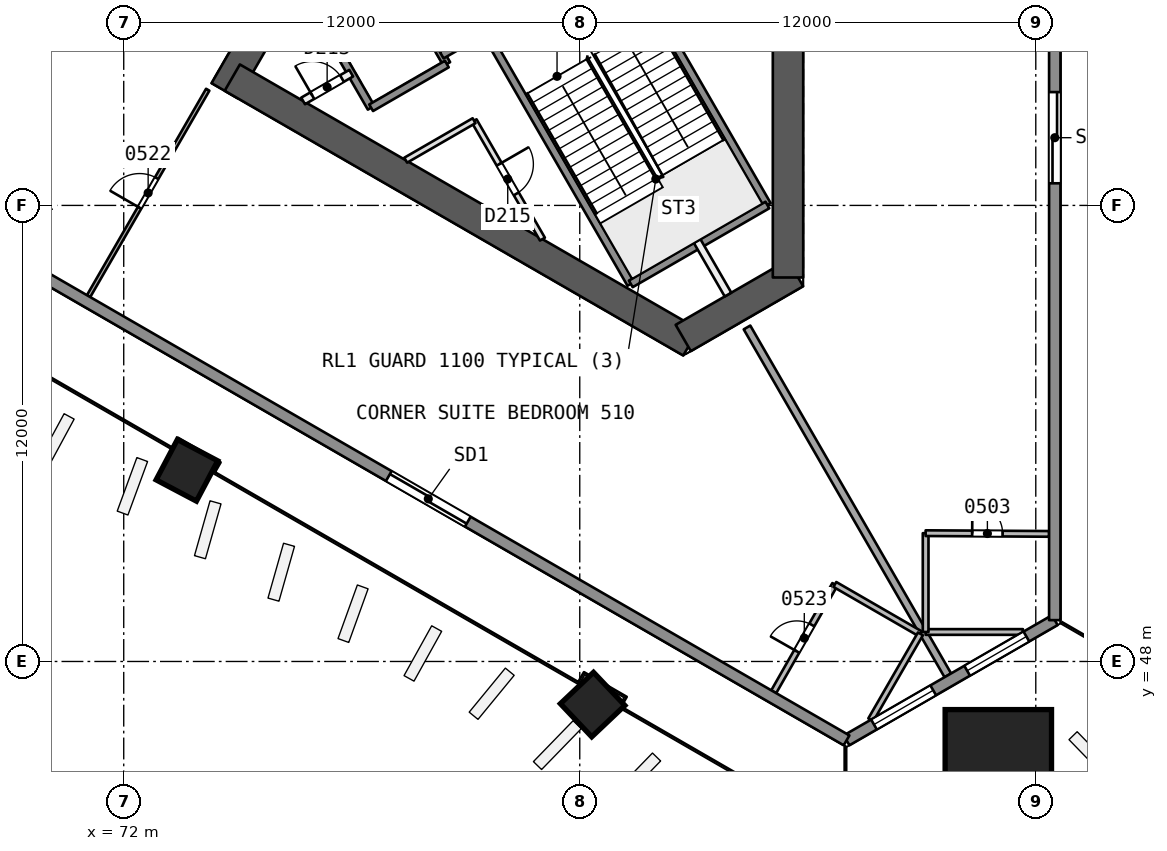
"""IFC4 building model, lengths in metres.
Left out: names, types, materials, properties, quantities, classifications, styles, units other than length and angle.
Written with IfcOpenShell. Run it as: python <this file> out.ifc"""

import sys

from ifc_helpers import new_model, si_unit, direction, frame, frame_2d, origin, origin_2d, place, context, subcontext, project, spatial, rectangle, extrude, element, fill, save


model = new_model("IFC4")
c1 = context("Model", 3, precision=1e-05, world=origin(), true_north=direction((0.0, 1.0)))
c2 = subcontext(c1, "Body", "Model", "MODEL_VIEW")
j1 = project(units=[si_unit("LENGTHUNIT", "METRE"), si_unit("PLANEANGLEUNIT", "RADIAN")], contexts=[c1])
p1 = place(None, origin())
s1 = spatial("IfcSite", under=j1, at=p1, CompositionType="ELEMENT")
p2 = place(p1, origin())
s2 = spatial("IfcBuilding", under=s1, at=p2, CompositionType="ELEMENT")
p3 = place(p2, frame((0.0, 0.0, 30.0)))
s3 = spatial("IfcBuildingStorey", under=s2, at=p3, CompositionType="ELEMENT", Elevation=30.0)
p4 = place(p3, frame((79.731, 71.806, 0.0), z_axis=(0.0, 0.0, 1.0), x_axis=(-0.49999662545, -0.866027352073, 0.0)))
e1 = element("IfcWall", 1, at=p4, inside=s3, PredefinedType="SHEAR", context=c2, shape_type="SweptSolid", body=[
    extrude(rectangle(XDim=10.149, YDim=0.8, at=frame_2d((5.074, 0.0))), origin(), (0.0, 0.0, 1.0), 3.7),
])
p5 = place(p4, frame((0.719, 0.0, 0.0)))
e2 = element("IfcOpeningElement", 2, at=p5, cuts=e1, PredefinedType="OPENING", context=c2, shape_type="SweptSolid", body=[
    extrude(rectangle(XDim=1.2, YDim=2.1, at=frame_2d((0.6, 1.05))), frame((0.0, 0.411, 0.0), z_axis=(0.0, -1.0, 0.0), x_axis=(1.0, 0.0, 0.0)), (0.0, 0.0, 1.0), 0.821),
])
p6 = place(p3, frame((74.856, 63.363, 0.0), z_axis=(0.0, 0.0, 1.0), x_axis=(0.866029478545, -0.499992942241, 0.0)))
e3 = element("IfcWall", 3, at=p6, inside=s3, PredefinedType="SHEAR", context=c2, shape_type="SweptSolid", body=[
    extrude(rectangle(XDim=13.933, YDim=0.8, at=frame_2d((6.967, 0.0))), origin(), (0.0, 0.0, 1.0), 3.7),
])
p7 = place(p3, frame((86.723, 56.512, 0.0), z_axis=(0.0, 0.0, 1.0), x_axis=(0.866034355626, 0.499984494636, 0.0)))
e4 = element("IfcWall", 4, at=p7, inside=s3, PredefinedType="SHEAR", context=c2, shape_type="SweptSolid", body=[
    extrude(rectangle(XDim=3.414, YDim=0.8, at=frame_2d((1.707, 0.0))), origin(), (0.0, 0.0, 1.0), 3.7),
])
p8 = place(p3, frame((89.48, 58.103, 0.0), z_axis=(0.0, 0.0, 1.0), x_axis=(0.0, 1.0, 0.0)))
e5 = element("IfcWall", 5, at=p8, inside=s3, PredefinedType="SHEAR", context=c2, shape_type="SweptSolid", body=[
    extrude(rectangle(XDim=14.103, YDim=0.8, at=frame_2d((7.051, 0.0))), origin(), (0.0, 0.0, 1.0), 3.7),
])
p9 = place(p3, frame((73.662, 53.002, 0.0), z_axis=(0.000857578916, 0.022824792675, 0.999739112668), x_axis=(-0.499938956565, -0.865825126557, 0.020196285069)))
e6 = element("IfcColumn", 6, at=p9, inside=s3, PredefinedType="COLUMN", context=c2, shape_type="SweptSolid", body=[
    extrude(rectangle(XDim=1.2, YDim=1.2, at=origin_2d()), origin(), (0.0, 0.0, 1.0), 3.701),
])
p10 = place(p3, frame((84.349, 46.832, 0.0), z_axis=(-0.008376454378, 0.028163354484, 0.999568237028), x_axis=(-0.500232049542, -0.86565577712, 0.020198320458)))
e7 = element("IfcColumn", 7, at=p10, inside=s3, PredefinedType="COLUMN", context=c2, shape_type="SweptSolid", body=[
    extrude(rectangle(XDim=1.2, YDim=1.2, at=origin_2d()), origin(), (0.0, 0.0, 1.0), 3.702),
])
p11 = place(p3, frame((95.035, 45.298, 0.0), z_axis=(-0.017607037296, 0.030466109479, 0.999380712447), x_axis=(-0.865809063816, -0.500374524745, 1.32655e-07)))
e8 = element("IfcColumn", 8, at=p11, inside=s3, PredefinedType="COLUMN", context=c2, shape_type="SweptSolid", body=[
    extrude(rectangle(XDim=2.8, YDim=2.8, at=origin_2d()), origin(), (0.0, 0.0, 1.0), 3.702),
])
p12 = place(p3, frame((95.662, 48.776, 0.0), z_axis=(0.0, 0.0, 1.0), x_axis=(-1.0, 0.0, 0.0)))
e9 = element("IfcWall", 9, at=p12, inside=s3, PredefinedType="PARTITIONING", context=c2, shape_type="SweptSolid", body=[
    extrude(rectangle(XDim=2.561, YDim=0.15, at=frame_2d((1.28, 0.0))), origin(), (0.0, 0.0, 1.0), 3.2),
])
p13 = place(p3, frame((93.102, 48.776, 0.0), z_axis=(0.0, 0.0, 1.0), x_axis=(0.0, 1.0, 0.0)))
e10 = element("IfcWall", 10, at=p13, inside=s3, PredefinedType="PARTITIONING", context=c2, shape_type="SweptSolid", body=[
    extrude(rectangle(XDim=2.6, YDim=0.15, at=frame_2d((1.3, 0.0))), origin(), (0.0, 0.0, 1.0), 3.2),
])
p14 = place(p3, frame((93.102, 51.376, 0.0), z_axis=(0.0, 0.0, 1.0), x_axis=(0.999982829145, -0.005860154821, 0.0)))
e11 = element("IfcWall", 11, at=p14, inside=s3, PredefinedType="PARTITIONING", context=c2, shape_type="SweptSolid", body=[
    extrude(rectangle(XDim=3.25, YDim=0.15, at=frame_2d((1.625, 0.0))), origin(), (0.0, 0.0, 1.0), 3.2),
])
p15 = place(p14, frame((1.225, 0.0, 0.0)))
e12 = element("IfcOpeningElement", 12, at=p15, cuts=e11, PredefinedType="OPENING", context=c2, shape_type="SweptSolid", body=[
    extrude(rectangle(XDim=0.8, YDim=2.1, at=frame_2d((0.4, 1.05))), frame((0.0, 0.085, 0.0), z_axis=(0.0, -1.0, 0.0), x_axis=(1.0, 0.0, 0.0)), (0.0, 0.0, 1.0), 0.171),
])
p16 = place(p3, frame((88.401, 56.789, 0.0), z_axis=(0.0, 0.0, 1.0), x_axis=(0.499997037832, -0.866027113986, 0.0)))
e13 = element("IfcWall", 13, at=p16, inside=s3, PredefinedType="PARTITIONING", context=c2, shape_type="SweptSolid", body=[
    extrude(rectangle(XDim=10.57, YDim=0.2, at=frame_2d((5.285, 0.0))), origin(), (0.0, 0.0, 1.0), 3.2),
])
p17 = place(p3, frame((63.919, 61.743, 0.0), z_axis=(0.0, 0.0, 1.0), x_axis=(0.500004709601, 0.866022684678, 0.0)))
e14 = element("IfcWall", 14, at=p17, inside=s3, PredefinedType="PARTITIONING", context=c2, shape_type="SweptSolid", body=[
    extrude(rectangle(XDim=14.251, YDim=0.2, at=frame_2d((7.125, 0.0))), origin(), (0.0, 0.0, 1.0), 3.2),
])
p18 = place(p3, frame((66.215, 60.418, 0.0), z_axis=(0.0, 0.0, 1.0), x_axis=(0.499997291418, 0.866026967579, 0.0)))
e15 = element("IfcWall", 15, at=p18, inside=s3, PredefinedType="PARTITIONING", context=c2, shape_type="SweptSolid", body=[
    extrude(rectangle(XDim=14.251, YDim=0.2, at=frame_2d((7.125, 0.0))), origin(), (0.0, 0.0, 1.0), 3.2),
])
p19 = place(p3, frame((71.074, 57.612, 0.0), z_axis=(0.0, 0.0, 1.0), x_axis=(0.499986391729, 0.866033260381, 0.0)))
e16 = element("IfcWall", 16, at=p19, inside=s3, PredefinedType="PARTITIONING", context=c2, shape_type="SweptSolid", body=[
    extrude(rectangle(XDim=6.272, YDim=0.1, at=frame_2d((3.136, 0.0))), origin(), (0.0, 0.0, 1.0), 3.2),
])
p20 = place(p19, frame((2.686, 0.0, 0.0)))
e17 = element("IfcOpeningElement", 17, at=p20, cuts=e16, PredefinedType="OPENING", context=c2, shape_type="SweptSolid", body=[
    extrude(rectangle(XDim=0.9, YDim=2.1, at=frame_2d((0.45, 1.05))), frame((0.0, 0.061, 0.0), z_axis=(0.0, -1.0, 0.0), x_axis=(1.0, 0.0, 0.0)), (0.0, 0.0, 1.0), 0.121),
])
p21 = place(p3, frame((89.104, 47.203, 0.0), z_axis=(0.0, 0.0, 1.0), x_axis=(0.494941047154, 0.868926556069, 0.0)))
e18 = element("IfcWall", 18, at=p21, inside=s3, PredefinedType="PARTITIONING", context=c2, shape_type="SweptSolid", body=[
    extrude(rectangle(XDim=3.25, YDim=0.15, at=frame_2d((1.625, 0.0))), origin(), (0.0, 0.0, 1.0), 3.2),
])
p22 = place(p21, frame((1.225, 0.0, 0.0)))
e19 = element("IfcOpeningElement", 19, at=p22, cuts=e18, PredefinedType="OPENING", context=c2, shape_type="SweptSolid", body=[
    extrude(rectangle(XDim=0.8, YDim=2.1, at=frame_2d((0.4, 1.05))), frame((0.0, 0.085, 0.0), z_axis=(0.0, -1.0, 0.0), x_axis=(1.0, 0.0, 0.0)), (0.0, 0.0, 1.0), 0.171),
])
p23 = place(p3, frame((90.713, 50.027, 0.0), z_axis=(0.0, 0.0, 1.0), x_axis=(0.865997922154, -0.500047596559, 0.0)))
e20 = element("IfcWall", 20, at=p23, inside=s3, PredefinedType="PARTITIONING", context=c2, shape_type="SweptSolid", body=[
    extrude(rectangle(XDim=2.6, YDim=0.15, at=frame_2d((1.3, 0.0))), origin(), (0.0, 0.0, 1.0), 3.2),
])
p24 = place(p3, frame((92.964, 48.727, 0.0), z_axis=(0.0, 0.0, 1.0), x_axis=(-0.499948995201, -0.866054849417, 0.0)))
e21 = element("IfcWall", 21, at=p24, inside=s3, PredefinedType="PARTITIONING", context=c2, shape_type="SweptSolid", body=[
    extrude(rectangle(XDim=2.612, YDim=0.15, at=frame_2d((1.306, 0.0))), origin(), (0.0, 0.0, 1.0), 3.2),
])
p25 = place(p3, frame((96.5, 49.088, 0.0), z_axis=(0.0, 0.0, 1.0), x_axis=(-0.866033291922, -0.499986337096, 0.0)))
e22 = element("IfcWall", 22, at=p25, inside=s3, PredefinedType="SOLIDWALL", context=c2, shape_type="SweptSolid", body=[
    extrude(rectangle(XDim=6.327, YDim=0.3, at=frame_2d((3.164, 0.0))), origin(), (0.0, 0.0, 1.0), 3.2),
])
p26 = place(p25, frame((0.863, 0.0, 0.9)))
e23 = element("IfcOpeningElement", 23, at=p26, cuts=e22, PredefinedType="OPENING", context=c2, shape_type="SweptSolid", body=[
    extrude(rectangle(XDim=1.8, YDim=1.5, at=frame_2d((0.9, 0.75))), frame((0.0, 0.161, 0.0), z_axis=(0.0, -1.0, 0.0), x_axis=(1.0, 0.0, 0.0)), (0.0, 0.0, 1.0), 0.321),
])
p27 = place(p25, frame((3.694, 0.0, 0.9)))
e24 = element("IfcOpeningElement", 24, at=p27, cuts=e22, PredefinedType="OPENING", context=c2, shape_type="SweptSolid", body=[
    extrude(rectangle(XDim=1.8, YDim=1.5, at=frame_2d((0.9, 0.75))), frame((0.0, 0.161, 0.0), z_axis=(0.0, -1.0, 0.0), x_axis=(1.0, 0.0, 0.0)), (0.0, 0.0, 1.0), 0.321),
])
p28 = place(p3, frame((96.5, 110.912, 0.0), z_axis=(0.0, 0.0, 1.0), x_axis=(0.0, -1.0, 0.0)))
e25 = element("IfcWall", 25, at=p28, inside=s3, PredefinedType="SOLIDWALL", context=c2, shape_type="SweptSolid", body=[
    extrude(rectangle(XDim=61.825, YDim=0.3, at=frame_2d((30.912, 0.0))), origin(), (0.0, 0.0, 1.0), 3.2),
])
p29 = place(p28, frame((29.089, 0.0, 0.0)))
e26 = element("IfcOpeningElement", 26, at=p29, cuts=e25, PredefinedType="OPENING", context=c2, shape_type="SweptSolid", body=[
    extrude(rectangle(XDim=2.4, YDim=2.4, at=frame_2d((1.2, 1.2))), frame((0.0, 0.161, 0.0), z_axis=(0.0, -1.0, 0.0), x_axis=(1.0, 0.0, 0.0)), (0.0, 0.0, 1.0), 0.321),
])
p30 = place(p28, frame((34.389, 0.0, 0.0)))
e27 = element("IfcOpeningElement", 27, at=p30, cuts=e25, PredefinedType="OPENING", context=c2, shape_type="SweptSolid", body=[
    extrude(rectangle(XDim=2.4, YDim=2.4, at=frame_2d((1.2, 1.2))), frame((0.0, 0.161, 0.0), z_axis=(0.0, -1.0, 0.0), x_axis=(1.0, 0.0, 0.0)), (0.0, 0.0, 1.0), 0.321),
])
p31 = place(p28, frame((47.93, 0.0, 0.0)))
e28 = element("IfcOpeningElement", 28, at=p31, cuts=e25, PredefinedType="OPENING", context=c2, shape_type="SweptSolid", body=[
    extrude(rectangle(XDim=2.4, YDim=2.4, at=frame_2d((1.2, 1.2))), frame((0.0, 0.161, 0.0), z_axis=(0.0, -1.0, 0.0), x_axis=(1.0, 0.0, 0.0)), (0.0, 0.0, 1.0), 0.321),
])
p32 = place(p28, frame((12.81, 0.0, 0.0)))
e29 = element("IfcOpeningElement", 29, at=p32, cuts=e25, PredefinedType="OPENING", context=c2, shape_type="SweptSolid", body=[
    extrude(rectangle(XDim=2.4, YDim=2.4, at=frame_2d((1.2, 1.2))), frame((0.0, 0.161, 0.0), z_axis=(0.0, -1.0, 0.0), x_axis=(1.0, 0.0, 0.0)), (0.0, 0.0, 1.0), 0.321),
])
p33 = place(p3, frame((91.021, 45.924, 0.0), z_axis=(0.0, 0.0, 1.0), x_axis=(-0.866024340432, 0.500001841776, 0.0)))
e30 = element("IfcWall", 30, at=p33, inside=s3, PredefinedType="SOLIDWALL", context=c2, shape_type="SweptSolid", body=[
    extrude(rectangle(XDim=61.824, YDim=0.3, at=frame_2d((30.912, 0.0))), origin(), (0.0, 0.0, 1.0), 3.2),
])
p34 = place(p33, frame((35.168, 0.0, 0.0)))
e31 = element("IfcOpeningElement", 31, at=p34, cuts=e30, PredefinedType="OPENING", context=c2, shape_type="SweptSolid", body=[
    extrude(rectangle(XDim=2.4, YDim=2.4, at=frame_2d((1.2, 1.2))), frame((0.0, 0.161, 0.0), z_axis=(0.0, -1.0, 0.0), x_axis=(1.0, 0.0, 0.0)), (0.0, 0.0, 1.0), 0.321),
])
p35 = place(p33, frame((47.93, 0.0, 0.0)))
e32 = element("IfcOpeningElement", 32, at=p35, cuts=e30, PredefinedType="OPENING", context=c2, shape_type="SweptSolid", body=[
    extrude(rectangle(XDim=2.4, YDim=2.4, at=frame_2d((1.2, 1.2))), frame((0.0, 0.161, 0.0), z_axis=(0.0, -1.0, 0.0), x_axis=(1.0, 0.0, 0.0)), (0.0, 0.0, 1.0), 0.321),
])
p36 = place(p33, frame((24.724, 0.0, 0.0)))
e33 = element("IfcOpeningElement", 33, at=p36, cuts=e30, PredefinedType="OPENING", context=c2, shape_type="SweptSolid", body=[
    extrude(rectangle(XDim=2.4, YDim=2.4, at=frame_2d((1.2, 1.2))), frame((0.0, 0.161, 0.0), z_axis=(0.0, -1.0, 0.0), x_axis=(1.0, 0.0, 0.0)), (0.0, 0.0, 1.0), 0.321),
])
p37 = place(p33, frame((11.509, 0.0, 0.0)))
e34 = element("IfcOpeningElement", 34, at=p37, cuts=e30, PredefinedType="OPENING", context=c2, shape_type="SweptSolid", body=[
    extrude(rectangle(XDim=2.4, YDim=2.4, at=frame_2d((1.2, 1.2))), frame((0.0, 0.161, 0.0), z_axis=(0.0, -1.0, 0.0), x_axis=(1.0, 0.0, 0.0)), (0.0, 0.0, 1.0), 0.321),
])
p38 = place(p33, frame((31.805, 0.0, 0.9)))
e35 = element("IfcOpeningElement", 35, at=p38, cuts=e30, PredefinedType="OPENING", context=c2, shape_type="SweptSolid", body=[
    extrude(rectangle(XDim=1.8, YDim=1.5, at=frame_2d((0.9, 0.75))), frame((0.0, 0.161, 0.0), z_axis=(0.0, -1.0, 0.0), x_axis=(1.0, 0.0, 0.0)), (0.0, 0.0, 1.0), 0.321),
])
p39 = place(p33, frame((29.155, 0.0, 0.9)))
e36 = element("IfcOpeningElement", 36, at=p39, cuts=e30, PredefinedType="OPENING", context=c2, shape_type="SweptSolid", body=[
    extrude(rectangle(XDim=1.8, YDim=1.5, at=frame_2d((0.9, 0.75))), frame((0.0, 0.161, 0.0), z_axis=(0.0, -1.0, 0.0), x_axis=(1.0, 0.0, 0.0)), (0.0, 0.0, 1.0), 0.321),
])
p40 = place(p3, frame((77.135, 64.952, 0.0), z_axis=(0.0, 0.0, 1.0), x_axis=(0.499996545922, -0.866027397988, 0.0)))
e37 = element("IfcWall", 37, at=p40, inside=s3, PredefinedType="SOLIDWALL", context=c2, shape_type="SweptSolid", body=[
    extrude(rectangle(XDim=2.75, YDim=0.2, at=frame_2d((1.375, 0.0))), origin(), (0.0, 0.0, 1.0), 3.2),
])
p41 = place(p3, frame((81.219, 62.229, 0.0), z_axis=(0.0, 0.0, 1.0), x_axis=(0.499992664208, -0.866029639064, 0.0)))
e38 = element("IfcWall", 38, at=p41, inside=s3, PredefinedType="PARTITIONING", context=c2, shape_type="SweptSolid", body=[
    extrude(rectangle(XDim=3.598, YDim=0.15, at=frame_2d((1.799, 0.0))), origin(), (0.0, 0.0, 1.0), 3.2),
])
p42 = place(p41, frame((1.322, 0.0, 0.0)))
e39 = element("IfcOpeningElement", 39, at=p42, cuts=e38, PredefinedType="OPENING", context=c2, shape_type="SweptSolid", body=[
    extrude(rectangle(XDim=0.9, YDim=2.1, at=frame_2d((0.45, 1.05))), frame((0.0, 0.085, 0.0), z_axis=(0.0, -1.0, 0.0), x_axis=(1.0, 0.0, 0.0)), (0.0, 0.0, 1.0), 0.171),
])
p43 = place(p3, frame((79.127, 66.102, 0.0), z_axis=(0.0, 0.0, 1.0), x_axis=(0.499996545922, -0.866027397988, 0.0)))
e40 = element("IfcWall", 40, at=p43, inside=s3, PredefinedType="SOLIDWALL", context=c2, shape_type="SweptSolid", body=[
    extrude(rectangle(XDim=2.75, YDim=0.2, at=frame_2d((1.375, 0.0))), origin(), (0.0, 0.0, 1.0), 3.2),
])
p44 = place(p3, frame((81.493, 64.604, 0.0), z_axis=(0.0, 0.0, 1.0), x_axis=(0.500006057782, -0.866021906294, 0.0)))
e41 = element("IfcWall", 41, at=p44, inside=s3, PredefinedType="SOLIDWALL", context=c2, shape_type="SweptSolid", body=[
    extrude(rectangle(XDim=7.7, YDim=0.2, at=frame_2d((3.85, 0.0))), origin(), (0.0, 0.0, 1.0), 3.2),
])
p45 = place(p3, frame((87.09, 59.06, 0.0), z_axis=(0.0, 0.0, 1.0), x_axis=(0.499956811548, -0.866050337213, 0.0)))
e42 = element("IfcWall", 42, at=p45, inside=s3, PredefinedType="PARTITIONING", context=c2, shape_type="SweptSolid", body=[
    extrude(rectangle(XDim=1.623, YDim=0.2, at=frame_2d((0.812, 0.0))), origin(), (0.0, 0.0, 1.0), 3.2),
])
p46 = place(p3, frame((85.087, 66.679, 0.0), z_axis=(0.0, 0.0, 1.0), x_axis=(0.500019787375, -0.866013979237, 0.0)))
e43 = element("IfcWall", 43, at=p46, inside=s3, PredefinedType="SOLIDWALL", context=c2, shape_type="SweptSolid", body=[
    extrude(rectangle(XDim=7.7, YDim=0.2, at=frame_2d((3.85, 0.0))), origin(), (0.0, 0.0, 1.0), 3.2),
])
p47 = place(p46, frame((0.55, 0.0, 0.0)))
e44 = element("IfcOpeningElement", 44, at=p47, cuts=e43, PredefinedType="OPENING", context=c2, shape_type="SweptSolid", body=[
    extrude(rectangle(XDim=1.1, YDim=2.1, at=frame_2d((0.55, 1.05))), frame((0.0, 0.11, 0.0), z_axis=(0.0, -1.0, 0.0), x_axis=(1.0, 0.0, 0.0)), (0.0, 0.0, 1.0), 0.221),
])
p48 = place(p3, frame((76.72, 62.749, 0.0), z_axis=(0.0, 0.0, 1.0), x_axis=(0.866054810376, 0.49994906283, 0.0)))
e45 = element("IfcWall", 45, at=p48, inside=s3, PredefinedType="PARTITIONING", context=c2, shape_type="SweptSolid", body=[
    extrude(rectangle(XDim=1.461, YDim=0.2, at=frame_2d((0.73, 0.0))), origin(), (0.0, 0.0, 1.0), 3.2),
])
p49 = place(p48, frame((0.281, 0.0, 0.0)))
e46 = element("IfcOpeningElement", 46, at=p49, cuts=e45, PredefinedType="OPENING", context=c2, shape_type="SweptSolid", body=[
    extrude(rectangle(XDim=0.9, YDim=2.1, at=frame_2d((0.45, 1.05))), frame((0.0, 0.11, 0.0), z_axis=(0.0, -1.0, 0.0), x_axis=(1.0, 0.0, 0.0)), (0.0, 0.0, 1.0), 0.221),
])
p50 = place(p3, frame((80.367, 63.954, 0.0), z_axis=(0.0, 0.0, 1.0), x_axis=(0.866026575979, 0.499997969693, 0.0)))
e47 = element("IfcWall", 47, at=p50, inside=s3, PredefinedType="SOLIDWALL", context=c2, shape_type="SweptSolid", body=[
    extrude(rectangle(XDim=6.75, YDim=0.2, at=frame_2d((3.375, 0.0))), origin(), (0.0, 0.0, 1.0), 3.2),
])
p51 = place(p3, frame((78.51, 62.57, 0.0), z_axis=(0.0, 0.0, 1.0), x_axis=(0.866053019151, 0.499952165731, 0.0)))
e48 = element("IfcWall", 48, at=p51, inside=s3, PredefinedType="SOLIDWALL", context=c2, shape_type="SweptSolid", body=[
    extrude(rectangle(XDim=2.3, YDim=0.2, at=frame_2d((1.15, 0.0))), origin(), (0.0, 0.0, 1.0), 3.2),
])
p52 = place(p3, frame((79.42, 61.19, 0.0), z_axis=(0.0, 0.0, 1.0), x_axis=(0.866050549317, 0.49995644413, 0.0)))
e49 = element("IfcWall", 49, at=p52, inside=s3, PredefinedType="PARTITIONING", context=c2, shape_type="SweptSolid", body=[
    extrude(rectangle(XDim=2.077, YDim=0.15, at=frame_2d((1.039, 0.0))), origin(), (0.0, 0.0, 1.0), 3.2),
])
p53 = place(p3, frame((85.343, 57.935, 0.0), z_axis=(0.0, 0.0, 1.0), x_axis=(0.866004344652, 0.500036473714, 0.0)))
e50 = element("IfcWall", 50, at=p53, inside=s3, PredefinedType="SOLIDWALL", context=c2, shape_type="SweptSolid", body=[
    extrude(rectangle(XDim=4.15, YDim=0.2, at=frame_2d((2.075, 0.0))), origin(), (0.0, 0.0, 1.0), 3.2),
])
p54 = place(p15, origin())
e51 = element("IfcDoor", 51, at=p54, inside=s3, OperationType="SINGLE_SWING_LEFT", PredefinedType="NOTDEFINED", context=c2, shape_type="SweptSolid", body=[
    extrude(rectangle(XDim=0.8, YDim=2.1, at=frame_2d((0.4, 1.05))), frame((0.0, 0.025, 0.0), z_axis=(0.0, -1.0, 0.0), x_axis=(1.0, 0.0, 0.0)), (0.0, 0.0, 1.0), 0.05),
])
fill(e12, e51)
p55 = place(p20, origin())
e52 = element("IfcDoor", 52, at=p55, inside=s3, OperationType="SINGLE_SWING_LEFT", PredefinedType="NOTDEFINED", context=c2, shape_type="SweptSolid", body=[
    extrude(rectangle(XDim=0.9, YDim=2.1, at=frame_2d((0.45, 1.05))), frame((0.0, 0.025, 0.0), z_axis=(0.0, -1.0, 0.0), x_axis=(1.0, 0.0, 0.0)), (0.0, 0.0, 1.0), 0.05),
])
fill(e17, e52)
p56 = place(p22, origin())
e53 = element("IfcDoor", 53, at=p56, inside=s3, OperationType="SINGLE_SWING_LEFT", PredefinedType="NOTDEFINED", context=c2, shape_type="SweptSolid", body=[
    extrude(rectangle(XDim=0.8, YDim=2.1, at=frame_2d((0.4, 1.05))), frame((0.0, 0.025, 0.0), z_axis=(0.0, -1.0, 0.0), x_axis=(1.0, 0.0, 0.0)), (0.0, 0.0, 1.0), 0.05),
])
fill(e19, e53)
p57 = place(p26, origin())
e54 = element("IfcWindow", 54, at=p57, inside=s3, PartitioningType="SINGLE_PANEL", PredefinedType="WINDOW", context=c2, shape_type="SweptSolid", body=[
    extrude(rectangle(XDim=1.8, YDim=1.5, at=frame_2d((0.9, 0.75))), frame((0.0, 0.03, 0.0), z_axis=(0.0, -1.0, 0.0), x_axis=(1.0, 0.0, 0.0)), (0.0, 0.0, 1.0), 0.06),
])
fill(e23, e54)
p58 = place(p27, origin())
e55 = element("IfcWindow", 55, at=p58, inside=s3, PartitioningType="SINGLE_PANEL", PredefinedType="WINDOW", context=c2, shape_type="SweptSolid", body=[
    extrude(rectangle(XDim=1.8, YDim=1.5, at=frame_2d((0.9, 0.75))), frame((0.0, 0.03, 0.0), z_axis=(0.0, -1.0, 0.0), x_axis=(1.0, 0.0, 0.0)), (0.0, 0.0, 1.0), 0.06),
])
fill(e24, e55)
p59 = place(p31, origin())
e56 = element("IfcDoor", 56, at=p59, inside=s3, OperationType="SLIDING_TO_LEFT", PredefinedType="NOTDEFINED", context=c2, shape_type="SweptSolid", body=[
    extrude(rectangle(XDim=2.4, YDim=2.4, at=frame_2d((1.2, 1.2))), frame((0.0, 0.025, 0.0), z_axis=(0.0, -1.0, 0.0), x_axis=(1.0, 0.0, 0.0)), (0.0, 0.0, 1.0), 0.05),
])
fill(e28, e56)
p60 = place(p37, origin())
e57 = element("IfcDoor", 57, at=p60, inside=s3, OperationType="SLIDING_TO_RIGHT", PredefinedType="NOTDEFINED", context=c2, shape_type="SweptSolid", body=[
    extrude(rectangle(XDim=2.4, YDim=2.4, at=frame_2d((1.2, 1.2))), frame((0.0, 0.025, 0.0), z_axis=(0.0, -1.0, 0.0), x_axis=(1.0, 0.0, 0.0)), (0.0, 0.0, 1.0), 0.05),
])
fill(e34, e57)
p61 = place(p49, origin())
e58 = element("IfcDoor", 58, at=p61, inside=s3, OperationType="SINGLE_SWING_LEFT", PredefinedType="NOTDEFINED", context=c2, shape_type="SweptSolid", body=[
    extrude(rectangle(XDim=0.9, YDim=2.1, at=frame_2d((0.45, 1.05))), frame((0.0, 0.025, 0.0), z_axis=(0.0, -1.0, 0.0), x_axis=(1.0, 0.0, 0.0)), (0.0, 0.0, 1.0), 0.05),
])
fill(e46, e58)
p62 = place(p42, origin())
e59 = element("IfcDoor", 59, at=p62, inside=s3, OperationType="SINGLE_SWING_LEFT", PredefinedType="NOTDEFINED", context=c2, shape_type="SweptSolid", body=[
    extrude(rectangle(XDim=0.9, YDim=2.1, at=frame_2d((0.45, 1.05))), frame((0.0, 0.025, 0.0), z_axis=(0.0, -1.0, 0.0), x_axis=(1.0, 0.0, 0.0)), (0.0, 0.0, 1.0), 0.05),
])
fill(e39, e59)
save(model, sys.argv[1])
